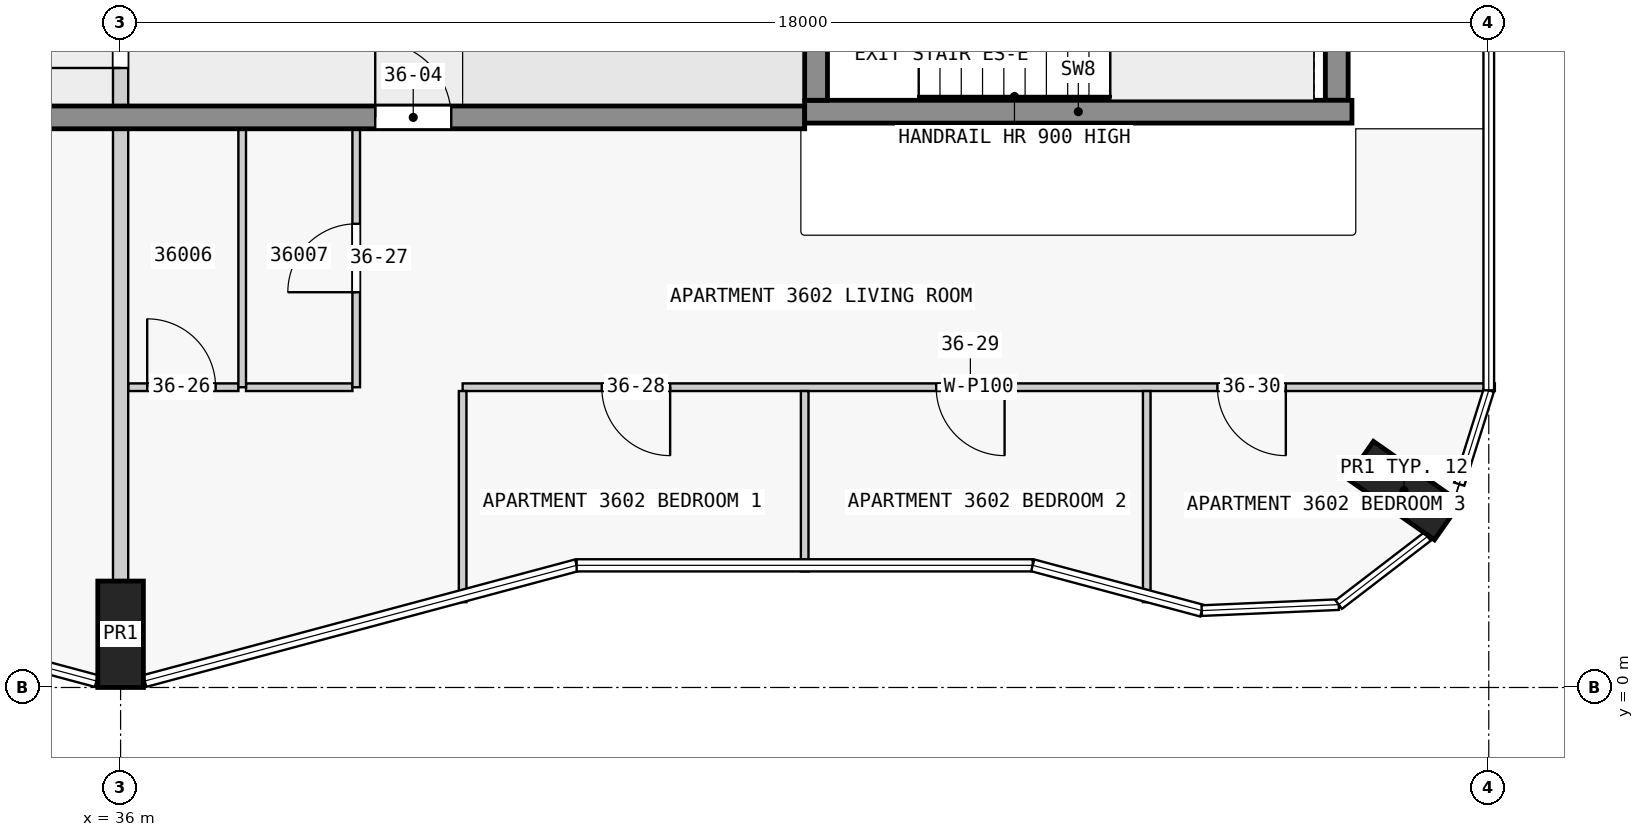
"""IFC4 building model, lengths in metres.
Left out: names, types, materials, properties, quantities, classifications, styles, units other than length and angle.
Written with IfcOpenShell. Run it as: python <this file> out.ifc"""

import sys

from ifc_helpers import new_model, si_unit, direction, frame, frame_2d, origin, origin_2d, place, context, subcontext, project, spatial, rectangle, extrude, element, fill, save


model = new_model("IFC4")
c1 = context("Model", 3, precision=1e-05, world=origin(), true_north=direction((0.0, 1.0)))
c2 = subcontext(c1, "Body", "Model", "MODEL_VIEW")
j1 = project(units=[si_unit("LENGTHUNIT", "METRE"), si_unit("PLANEANGLEUNIT", "RADIAN")], contexts=[c1])
p1 = place(None, origin())
s1 = spatial("IfcSite", under=j1, at=p1, CompositionType="ELEMENT")
p2 = place(p1, origin())
s2 = spatial("IfcBuilding", under=s1, at=p2, CompositionType="ELEMENT")
p3 = place(p2, frame((0.0, 0.0, 142.9)))
s3 = spatial("IfcBuildingStorey", under=s2, at=p3, CompositionType="ELEMENT", Elevation=142.9)
for number, where, z_axis, x_axis in (
    (1, (36.0, 0.7, 0.0), (0.0, 0.0, 1.0), (1.0, 0.0, 0.0)),
    (2, (52.884, 2.59, 0.0), (0.0, 0.0, 1.0), (0.574, 0.819, 0.0)),
):
    element("IfcColumn", number, at=place(p3, frame(where, z_axis=z_axis, x_axis=x_axis)), inside=s3, PredefinedType="COLUMN", context=c2, shape_type="SweptSolid", body=[
        extrude(rectangle(XDim=0.6, YDim=1.4, at=origin_2d()), origin(), (0.0, 0.0, 1.0), 3.5),
    ])
p4 = place(p3, frame((45.15, 7.725, 0.0), z_axis=(0.0, 0.0, 1.0), x_axis=(0.0, 1.0, 0.0)))
e3 = element("IfcWall", 3, at=p4, inside=s3, PredefinedType="SHEAR", context=c2, shape_type="SweptSolid", body=[
    extrude(rectangle(XDim=2.55, YDim=0.3, at=frame_2d((1.275, 0.0))), origin(), (0.0, 0.0, 1.0), 3.5),
])
p5 = place(p4, frame((0.725, 0.0, 0.0)))
e4 = element("IfcOpeningElement", 4, at=p5, cuts=e3, PredefinedType="OPENING", context=c2, shape_type="SweptSolid", body=[
    extrude(rectangle(XDim=1.1, YDim=2.1, at=frame_2d((0.55, 1.05))), frame((0.0, 0.16, 0.0), z_axis=(0.0, -1.0, 0.0), x_axis=(1.0, 0.0, 0.0)), (0.0, 0.0, 1.0), 0.32),
])
p6 = place(p3, frame((52.0, 7.725, 0.0), z_axis=(0.0, 0.0, 1.0), x_axis=(0.0, 1.0, 0.0)))
e5 = element("IfcWall", 5, at=p6, inside=s3, PredefinedType="SHEAR", context=c2, shape_type="SweptSolid", body=[
    extrude(rectangle(XDim=2.55, YDim=0.3, at=frame_2d((1.275, 0.0))), origin(), (0.0, 0.0, 1.0), 3.5),
])
p7 = place(p3, frame((45.0, 7.575, 0.0), z_axis=(0.0, 0.0, 1.0), x_axis=(1.0, 0.0, 0.0)))
e6 = element("IfcWall", 6, at=p7, inside=s3, PredefinedType="SHEAR", context=c2, shape_type="SweptSolid", body=[
    extrude(rectangle(XDim=7.2, YDim=0.3, at=frame_2d((3.6, 0.0))), origin(), (0.0, 0.0, 1.0), 3.5),
])
p8 = place(p3, frame((22.5, 7.5, 0.0), z_axis=(0.0, 0.0, 1.0), x_axis=(1.0, 0.0, 0.0)))
e7 = element("IfcWall", 7, at=p8, inside=s3, PredefinedType="SHEAR", context=c2, shape_type="SweptSolid", body=[
    extrude(rectangle(XDim=22.5, YDim=0.3, at=frame_2d((11.25, 0.0))), origin(), (0.0, 0.0, 1.0), 3.25),
])
p9 = place(p8, frame((1.75, 0.0, 0.0)))
e8 = element("IfcOpeningElement", 8, at=p9, cuts=e7, PredefinedType="OPENING", context=c2, shape_type="SweptSolid", body=[
    extrude(rectangle(XDim=1.0, YDim=2.1, at=frame_2d((0.5, 1.05))), frame((0.0, 0.16, 0.0), z_axis=(0.0, -1.0, 0.0), x_axis=(1.0, 0.0, 0.0)), (0.0, 0.0, 1.0), 0.32),
])
p10 = place(p8, frame((6.25, 0.0, 0.0)))
e9 = element("IfcOpeningElement", 9, at=p10, cuts=e7, PredefinedType="OPENING", context=c2, shape_type="SweptSolid", body=[
    extrude(rectangle(XDim=1.0, YDim=2.1, at=frame_2d((0.5, 1.05))), frame((0.0, 0.16, 0.0), z_axis=(0.0, -1.0, 0.0), x_axis=(1.0, 0.0, 0.0)), (0.0, 0.0, 1.0), 0.32),
])
p11 = place(p8, frame((10.35, 0.0, 0.0)))
e10 = element("IfcOpeningElement", 10, at=p11, cuts=e7, PredefinedType="OPENING", context=c2, shape_type="SweptSolid", body=[
    extrude(rectangle(XDim=1.8, YDim=2.1, at=frame_2d((0.9, 1.05))), frame((0.0, 0.16, 0.0), z_axis=(0.0, -1.0, 0.0), x_axis=(1.0, 0.0, 0.0)), (0.0, 0.0, 1.0), 0.32),
])
p12 = place(p8, frame((16.85, 0.0, 0.0)))
e11 = element("IfcOpeningElement", 11, at=p12, cuts=e7, PredefinedType="OPENING", context=c2, shape_type="SweptSolid", body=[
    extrude(rectangle(XDim=1.0, YDim=2.1, at=frame_2d((0.5, 1.05))), frame((0.0, 0.16, 0.0), z_axis=(0.0, -1.0, 0.0), x_axis=(1.0, 0.0, 0.0)), (0.0, 0.0, 1.0), 0.32),
])
p13 = place(p3, frame((54.08, 3.95, 0.0), z_axis=(0.0, 0.0, 1.0), x_axis=(-1.0, 0.0, 0.0)))
e12 = element("IfcWall", 12, at=p13, inside=s3, PredefinedType="PARTITIONING", context=c2, shape_type="SweptSolid", body=[
    extrude(rectangle(XDim=13.58, YDim=0.1, at=frame_2d((6.79, 0.0))), origin(), (0.0, 0.0, 1.0), 3.25),
])
p14 = place(p13, frame((10.85, 0.0, 0.0)))
e13 = element("IfcOpeningElement", 13, at=p14, cuts=e12, PredefinedType="OPENING", context=c2, shape_type="SweptSolid", body=[
    extrude(rectangle(XDim=0.9, YDim=2.1, at=frame_2d((0.45, 1.05))), frame((0.0, 0.06, 0.0), z_axis=(0.0, -1.0, 0.0), x_axis=(1.0, 0.0, 0.0)), (0.0, 0.0, 1.0), 0.12),
])
p15 = place(p13, frame((6.45, 0.0, 0.0)))
e14 = element("IfcOpeningElement", 14, at=p15, cuts=e12, PredefinedType="OPENING", context=c2, shape_type="SweptSolid", body=[
    extrude(rectangle(XDim=0.9, YDim=2.1, at=frame_2d((0.45, 1.05))), frame((0.0, 0.06, 0.0), z_axis=(0.0, -1.0, 0.0), x_axis=(1.0, 0.0, 0.0)), (0.0, 0.0, 1.0), 0.12),
])
p16 = place(p13, frame((2.75, 0.0, 0.0)))
e15 = element("IfcOpeningElement", 15, at=p16, cuts=e12, PredefinedType="OPENING", context=c2, shape_type="SweptSolid", body=[
    extrude(rectangle(XDim=0.9, YDim=2.1, at=frame_2d((0.45, 1.05))), frame((0.0, 0.06, 0.0), z_axis=(0.0, -1.0, 0.0), x_axis=(1.0, 0.0, 0.0)), (0.0, 0.0, 1.0), 0.12),
])
p17 = place(p3, frame((36.1, 3.95, 0.0), z_axis=(0.0, 0.0, 1.0), x_axis=(1.0, 0.0, 0.0)))
e16 = element("IfcWall", 16, at=p17, inside=s3, PredefinedType="PARTITIONING", context=c2, shape_type="SweptSolid", body=[
    extrude(rectangle(XDim=1.45, YDim=0.1, at=frame_2d((0.725, 0.0))), origin(), (0.0, 0.0, 1.0), 3.25),
])
p18 = place(p17, frame((0.25, 0.0, 0.0)))
e17 = element("IfcOpeningElement", 17, at=p18, cuts=e16, PredefinedType="OPENING", context=c2, shape_type="SweptSolid", body=[
    extrude(rectangle(XDim=0.9, YDim=2.1, at=frame_2d((0.45, 1.05))), frame((0.0, 0.06, 0.0), z_axis=(0.0, -1.0, 0.0), x_axis=(1.0, 0.0, 0.0)), (0.0, 0.0, 1.0), 0.12),
])
p19 = place(p3, frame((37.65, 3.95, 0.0), z_axis=(0.0, 0.0, 1.0), x_axis=(1.0, 0.0, 0.0)))
e18 = element("IfcWall", 18, at=p19, inside=s3, PredefinedType="PARTITIONING", context=c2, shape_type="SweptSolid", body=[
    extrude(rectangle(XDim=1.4, YDim=0.1, at=frame_2d((0.7, 0.0))), origin(), (0.0, 0.0, 1.0), 3.25),
])
p20 = place(p3, frame((36.0, 1.4, 0.0), z_axis=(0.0, 0.0, 1.0), x_axis=(0.0, 1.0, 0.0)))
e19 = element("IfcWall", 19, at=p20, inside=s3, PredefinedType="PARTITIONING", context=c2, shape_type="SweptSolid", body=[
    extrude(rectangle(XDim=5.95, YDim=0.2, at=frame_2d((2.975, 0.0))), origin(), (0.0, 0.0, 1.0), 3.25),
])
p21 = place(p3, frame((37.6, 3.95, 0.0), z_axis=(0.0, 0.0, 1.0), x_axis=(0.0, 1.0, 0.0)))
e20 = element("IfcWall", 20, at=p21, inside=s3, PredefinedType="PARTITIONING", context=c2, shape_type="SweptSolid", body=[
    extrude(rectangle(XDim=3.4, YDim=0.1, at=frame_2d((1.7, 0.0))), origin(), (0.0, 0.0, 1.0), 3.25),
])
p22 = place(p3, frame((39.1, 3.95, 0.0), z_axis=(0.0, 0.0, 1.0), x_axis=(0.0, 1.0, 0.0)))
e21 = element("IfcWall", 21, at=p22, inside=s3, PredefinedType="PARTITIONING", context=c2, shape_type="SweptSolid", body=[
    extrude(rectangle(XDim=3.4, YDim=0.1, at=frame_2d((1.7, 0.0))), origin(), (0.0, 0.0, 1.0), 3.25),
])
p23 = place(p22, frame((1.25, 0.0, 0.0)))
e22 = element("IfcOpeningElement", 22, at=p23, cuts=e21, PredefinedType="OPENING", context=c2, shape_type="SweptSolid", body=[
    extrude(rectangle(XDim=0.9, YDim=2.1, at=frame_2d((0.45, 1.05))), frame((0.0, 0.06, 0.0), z_axis=(0.0, -1.0, 0.0), x_axis=(1.0, 0.0, 0.0)), (0.0, 0.0, 1.0), 0.12),
])
p24 = place(p3, frame((40.5, 3.9, 0.0), z_axis=(0.0, 0.0, 1.0), x_axis=(0.0, -1.0, 0.0)))
e23 = element("IfcWall", 23, at=p24, inside=s3, PredefinedType="PARTITIONING", context=c2, shape_type="SweptSolid", body=[
    extrude(rectangle(XDim=2.778, YDim=0.1, at=frame_2d((1.389, 0.0))), origin(), (0.0, 0.0, 1.0), 3.25),
])
p25 = place(p3, frame((45.0, 1.527, 0.0), z_axis=(0.0, 0.0, 1.0), x_axis=(0.0, 1.0, 0.0)))
e24 = element("IfcWall", 24, at=p25, inside=s3, PredefinedType="PARTITIONING", context=c2, shape_type="SweptSolid", body=[
    extrude(rectangle(XDim=2.373, YDim=0.1, at=frame_2d((1.187, 0.0))), origin(), (0.0, 0.0, 1.0), 3.25),
])
p26 = place(p3, frame((49.5, 1.122, 0.0), z_axis=(0.0, 0.0, 1.0), x_axis=(0.0, 1.0, 0.0)))
e25 = element("IfcWall", 25, at=p26, inside=s3, PredefinedType="PARTITIONING", context=c2, shape_type="SweptSolid", body=[
    extrude(rectangle(XDim=2.778, YDim=0.1, at=frame_2d((1.389, 0.0))), origin(), (0.0, 0.0, 1.0), 3.25),
])
p27 = place(p3, frame((36.0, 7.45, 0.0), z_axis=(0.0, 0.0, 1.0), x_axis=(0.0, 1.0, 0.0)))
e26 = element("IfcWall", 26, at=p27, inside=s3, PredefinedType="PARTITIONING", context=c2, shape_type="SweptSolid", body=[
    extrude(rectangle(XDim=3.1, YDim=0.2, at=frame_2d((1.55, 0.0))), origin(), (0.0, 0.0, 1.0), 3.25),
])
p28 = place(p27, frame((0.7, 0.0, 0.0)))
e27 = element("IfcOpeningElement", 27, at=p28, cuts=e26, PredefinedType="OPENING", context=c2, shape_type="SweptSolid", body=[
    extrude(rectangle(XDim=1.8, YDim=2.1, at=frame_2d((0.9, 1.05))), frame((0.0, 0.11, 0.0), z_axis=(0.0, -1.0, 0.0), x_axis=(1.0, 0.0, 0.0)), (0.0, 0.0, 1.0), 0.22),
])
p29 = place(p12, origin())
e28 = element("IfcDoor", 28, at=p29, inside=s3, OperationType="SINGLE_SWING_RIGHT", PredefinedType="DOOR", context=c2, shape_type="SweptSolid", body=[
    extrude(rectangle(XDim=1.0, YDim=2.1, at=frame_2d((0.5, 1.05))), frame((0.0, 0.025, 0.0), z_axis=(0.0, -1.0, 0.0), x_axis=(1.0, 0.0, 0.0)), (0.0, 0.0, 1.0), 0.05),
])
fill(e11, e28)
p30 = place(p28, origin())
e29 = element("IfcDoor", 29, at=p30, inside=s3, OperationType="SINGLE_SWING_RIGHT", PredefinedType="DOOR", context=c2, shape_type="SweptSolid", body=[
    extrude(rectangle(XDim=1.8, YDim=2.1, at=frame_2d((0.9, 1.05))), frame((0.0, 0.025, 0.0), z_axis=(0.0, -1.0, 0.0), x_axis=(1.0, 0.0, 0.0)), (0.0, 0.0, 1.0), 0.05),
])
fill(e27, e29)
p31 = place(p18, origin())
e30 = element("IfcDoor", 30, at=p31, inside=s3, OperationType="SINGLE_SWING_LEFT", PredefinedType="DOOR", context=c2, shape_type="SweptSolid", body=[
    extrude(rectangle(XDim=0.9, YDim=2.1, at=frame_2d((0.45, 1.05))), frame((0.0, 0.025, 0.0), z_axis=(0.0, -1.0, 0.0), x_axis=(1.0, 0.0, 0.0)), (0.0, 0.0, 1.0), 0.05),
])
fill(e17, e30)
p32 = place(p23, origin())
e31 = element("IfcDoor", 31, at=p32, inside=s3, OperationType="SINGLE_SWING_RIGHT", PredefinedType="DOOR", context=c2, shape_type="SweptSolid", body=[
    extrude(rectangle(XDim=0.9, YDim=2.1, at=frame_2d((0.45, 1.05))), frame((0.0, 0.025, 0.0), z_axis=(0.0, -1.0, 0.0), x_axis=(1.0, 0.0, 0.0)), (0.0, 0.0, 1.0), 0.05),
])
fill(e22, e31)
p33 = place(p14, origin())
e32 = element("IfcDoor", 32, at=p33, inside=s3, OperationType="SINGLE_SWING_RIGHT", PredefinedType="DOOR", context=c2, shape_type="SweptSolid", body=[
    extrude(rectangle(XDim=0.9, YDim=2.1, at=frame_2d((0.45, 1.05))), frame((0.0, 0.025, 0.0), z_axis=(0.0, -1.0, 0.0), x_axis=(1.0, 0.0, 0.0)), (0.0, 0.0, 1.0), 0.05),
])
fill(e13, e32)
p34 = place(p15, origin())
e33 = element("IfcDoor", 33, at=p34, inside=s3, OperationType="SINGLE_SWING_RIGHT", PredefinedType="DOOR", context=c2, shape_type="SweptSolid", body=[
    extrude(rectangle(XDim=0.9, YDim=2.1, at=frame_2d((0.45, 1.05))), frame((0.0, 0.025, 0.0), z_axis=(0.0, -1.0, 0.0), x_axis=(1.0, 0.0, 0.0)), (0.0, 0.0, 1.0), 0.05),
])
fill(e14, e33)
p35 = place(p16, origin())
e34 = element("IfcDoor", 34, at=p35, inside=s3, OperationType="SINGLE_SWING_LEFT", PredefinedType="DOOR", context=c2, shape_type="SweptSolid", body=[
    extrude(rectangle(XDim=0.9, YDim=2.1, at=frame_2d((0.45, 1.05))), frame((0.0, 0.025, 0.0), z_axis=(0.0, -1.0, 0.0), x_axis=(1.0, 0.0, 0.0)), (0.0, 0.0, 1.0), 0.05),
])
fill(e15, e34)
save(model, sys.argv[1])
